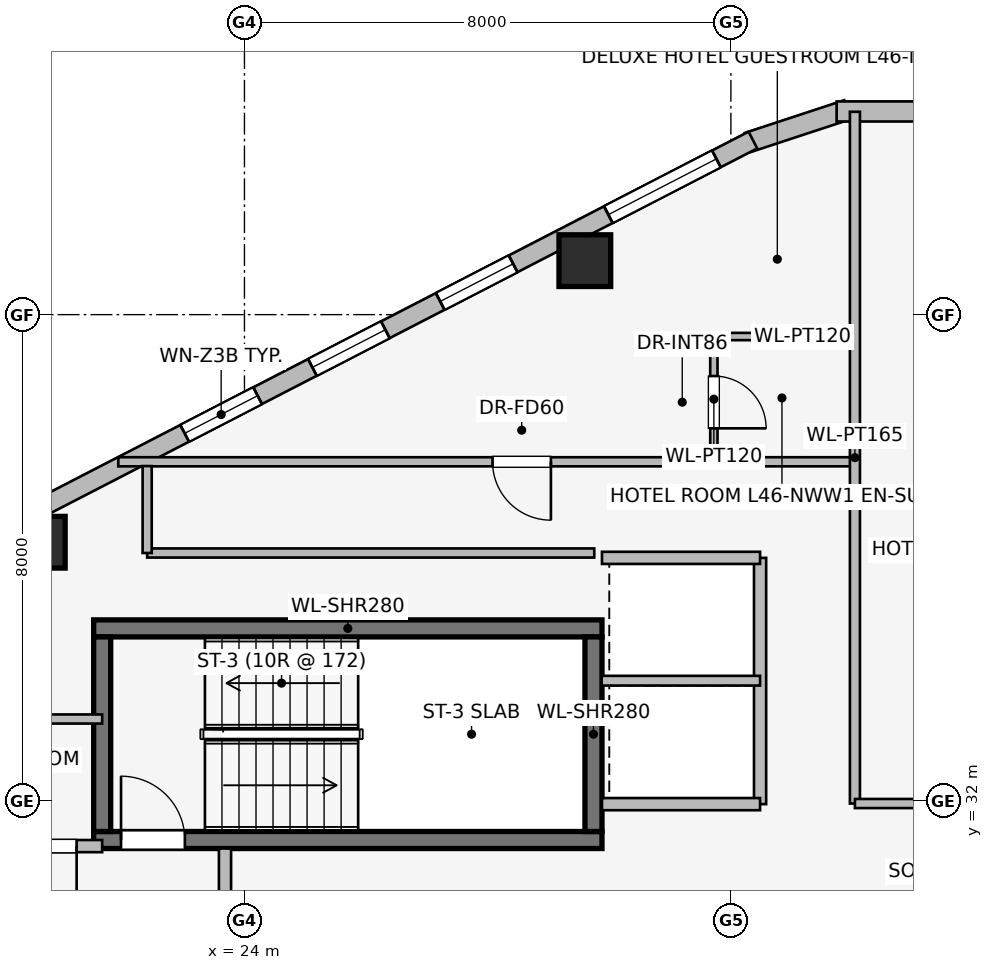
"""IFC4 building model, lengths in metres.
Left out: names, types, materials, properties, quantities, classifications, styles, units other than length and angle.
Written with IfcOpenShell. Run it as: python <this file> out.ifc"""

import sys

from ifc_helpers import new_model, si_unit, direction, frame, frame_2d, origin, origin_2d, place, context, subcontext, project, spatial, rectangle, extrude, element, fill, save


model = new_model("IFC4")
c1 = context("Model", 3, precision=1e-05, world=origin(), true_north=direction((0.0, 1.0)))
c2 = subcontext(c1, "Body", "Model", "MODEL_VIEW")
j1 = project(units=[si_unit("LENGTHUNIT", "METRE"), si_unit("PLANEANGLEUNIT", "RADIAN")], contexts=[c1])
p1 = place(None, origin())
s1 = spatial("IfcSite", under=j1, at=p1, CompositionType="ELEMENT")
p2 = place(p1, origin())
s2 = spatial("IfcBuilding", under=s1, at=p2, CompositionType="ELEMENT")
p3 = place(p2, frame((0.0, 0.0, 170.55)))
s3 = spatial("IfcBuildingStorey", under=s2, at=p3, CompositionType="ELEMENT", Elevation=170.55)
p4 = place(p3, frame((21.52, 31.36, 0.0), z_axis=(0.0, 0.0, 1.0), x_axis=(1.0, 0.0, 0.0)))
e1 = element("IfcWall", 1, at=p4, inside=s3, PredefinedType="SHEAR", context=c2, shape_type="SweptSolid", body=[
    extrude(rectangle(XDim=8.36, YDim=0.28, at=frame_2d((4.18, 0.0))), origin(), (0.0, 0.0, 1.0), 3.45),
])
p5 = place(p4, frame((0.45, 0.0, 0.0)))
e2 = element("IfcOpeningElement", 2, at=p5, cuts=e1, PredefinedType="OPENING", context=c2, shape_type="SweptSolid", body=[
    extrude(rectangle(XDim=1.05, YDim=2.0, at=frame_2d((0.525, 1.0))), frame((0.0, 0.15, 0.0), z_axis=(0.0, -1.0, 0.0), x_axis=(1.0, 0.0, 0.0)), (0.0, 0.0, 1.0), 0.3),
])
p6 = place(p3, frame((29.88, 34.84, 0.0), z_axis=(0.0, 0.0, 1.0), x_axis=(-1.0, 0.0, 0.0)))
e3 = element("IfcWall", 3, at=p6, inside=s3, PredefinedType="SHEAR", context=c2, shape_type="SweptSolid", body=[
    extrude(rectangle(XDim=8.36, YDim=0.28, at=frame_2d((4.18, 0.0))), origin(), (0.0, 0.0, 1.0), 3.45),
])
for number, where, z_axis, x_axis in (
    (4, (21.66, 34.7, 0.0), (0.0, 0.0, 1.0), (0.0, -1.0, 0.0)),
    (5, (29.74, 31.5, 0.0), (0.0, 0.0, 1.0), (0.0, 1.0, 0.0)),
):
    element("IfcWall", number, at=place(p3, frame(where, z_axis=z_axis, x_axis=x_axis)), inside=s3, PredefinedType="SHEAR", context=c2, shape_type="SweptSolid", body=[
        extrude(rectangle(XDim=3.2, YDim=0.28, at=frame_2d((1.6, 0.0))), origin(), (0.0, 0.0, 1.0), 3.45),
    ])
for number, where, z_axis, x_axis in (
    (6, (29.598, 40.888, 0.0), (0.0, 0.0, 1.0), (1.0, 0.0, 0.0)),
    (7, (20.626, 36.257, 0.0), (0.0, 0.0, 1.0), (1.0, 0.0, 0.0)),
):
    element("IfcColumn", number, at=place(p3, frame(where, z_axis=z_axis, x_axis=x_axis)), inside=s3, PredefinedType="COLUMN", context=c2, shape_type="SweptSolid", body=[
        extrude(rectangle(XDim=0.85, YDim=0.85, at=origin_2d()), origin(), (0.0, 0.0, 1.0), 3.45),
    ])
p7 = place(p3, frame((32.281, 42.832, 0.0), z_axis=(0.0, 0.0, 1.0), x_axis=(0.949937416267, 0.312440242569, 0.0)))
e8 = element("IfcWall", 8, at=p7, inside=s3, PredefinedType="STANDARD", context=c2, shape_type="SweptSolid", body=[
    extrude(rectangle(XDim=1.722, YDim=0.33, at=frame_2d((0.861, 0.0))), origin(), (0.0, 0.0, 1.0), 3.16),
])
p8 = place(p3, frame((33.739, 43.341, 0.0), z_axis=(0.0, 0.0, 1.0), x_axis=(1.0, 0.0, 0.0)))
e9 = element("IfcWall", 9, at=p8, inside=s3, PredefinedType="STANDARD", context=c2, shape_type="SweptSolid", body=[
    extrude(rectangle(XDim=1.722, YDim=0.33, at=frame_2d((0.861, 0.0))), origin(), (0.0, 0.0, 1.0), 3.16),
])
p9 = place(p3, frame((17.408, 35.153, 0.0), z_axis=(0.0, 0.0, 1.0), x_axis=(0.888626188278, 0.458632202867, 0.0)))
e10 = element("IfcWall", 10, at=p9, inside=s3, PredefinedType="STANDARD", context=c2, shape_type="SweptSolid", body=[
    extrude(rectangle(XDim=16.828, YDim=0.31, at=frame_2d((8.414, 0.0))), origin(), (0.0, 0.0, 1.0), 3.16),
])
p10 = place(p9, frame((0.675, 0.0, 0.75)))
e11 = element("IfcOpeningElement", 11, at=p10, cuts=e10, PredefinedType="OPENING", context=c2, shape_type="SweptSolid", body=[
    extrude(rectangle(XDim=2.0, YDim=1.5, at=frame_2d((1.0, 0.75))), frame((0.0, 0.165, 0.0), z_axis=(0.0, -1.0, 0.0), x_axis=(1.0, 0.0, 0.0)), (0.0, 0.0, 1.0), 0.33),
])
p11 = place(p9, frame((6.312, 0.0, 0.75)))
e12 = element("IfcOpeningElement", 12, at=p11, cuts=e10, PredefinedType="OPENING", context=c2, shape_type="SweptSolid", body=[
    extrude(rectangle(XDim=1.35, YDim=1.45, at=frame_2d((0.675, 0.725))), frame((0.0, 0.165, 0.0), z_axis=(0.0, -1.0, 0.0), x_axis=(1.0, 0.0, 0.0)), (0.0, 0.0, 1.0), 0.33),
])
p12 = place(p9, frame((8.676, 0.0, 0.75)))
e13 = element("IfcOpeningElement", 13, at=p12, cuts=e10, PredefinedType="OPENING", context=c2, shape_type="SweptSolid", body=[
    extrude(rectangle(XDim=1.35, YDim=1.45, at=frame_2d((0.675, 0.725))), frame((0.0, 0.165, 0.0), z_axis=(0.0, -1.0, 0.0), x_axis=(1.0, 0.0, 0.0)), (0.0, 0.0, 1.0), 0.33),
])
p13 = place(p9, frame((11.041, 0.0, 0.75)))
e14 = element("IfcOpeningElement", 14, at=p13, cuts=e10, PredefinedType="OPENING", context=c2, shape_type="SweptSolid", body=[
    extrude(rectangle(XDim=1.35, YDim=1.45, at=frame_2d((0.675, 0.725))), frame((0.0, 0.165, 0.0), z_axis=(0.0, -1.0, 0.0), x_axis=(1.0, 0.0, 0.0)), (0.0, 0.0, 1.0), 0.33),
])
p14 = place(p9, frame((14.153, 0.0, 0.75)))
e15 = element("IfcOpeningElement", 15, at=p14, cuts=e10, PredefinedType="OPENING", context=c2, shape_type="SweptSolid", body=[
    extrude(rectangle(XDim=2.0, YDim=1.5, at=frame_2d((1.0, 0.75))), frame((0.0, 0.165, 0.0), z_axis=(0.0, -1.0, 0.0), x_axis=(1.0, 0.0, 0.0)), (0.0, 0.0, 1.0), 0.33),
])
p15 = place(p3, frame((23.68, 25.68, 0.0), z_axis=(0.0, 0.0, 1.0), x_axis=(0.0, 1.0, 0.0)))
e16 = element("IfcWall", 16, at=p15, inside=s3, PredefinedType="PARTITIONING", context=c2, shape_type="SweptSolid", body=[
    extrude(rectangle(XDim=5.54, YDim=0.2, at=frame_2d((2.77, 0.0))), origin(), (0.0, 0.0, 1.0), 3.16),
])
p16 = place(p15, frame((1.8, 0.0, 0.0)))
e17 = element("IfcOpeningElement", 17, at=p16, cuts=e16, PredefinedType="OPENING", context=c2, shape_type="SweptSolid", body=[
    extrude(rectangle(XDim=1.05, YDim=2.0, at=frame_2d((0.525, 1.0))), frame((0.0, 0.11, 0.0), z_axis=(0.0, -1.0, 0.0), x_axis=(1.0, 0.0, 0.0)), (0.0, 0.0, 1.0), 0.22),
])
p17 = place(p3, frame((21.66, 31.26, 0.0), z_axis=(0.0, 0.0, 1.0), x_axis=(-1.0, 0.0, 0.0)))
e18 = element("IfcWall", 18, at=p17, inside=s3, PredefinedType="PARTITIONING", context=c2, shape_type="SweptSolid", body=[
    extrude(rectangle(XDim=2.01, YDim=0.2, at=frame_2d((1.005, 0.0))), origin(), (0.0, 0.0, 1.0), 3.16),
])
p18 = place(p17, frame((0.42, 0.0, 0.0)))
e19 = element("IfcOpeningElement", 19, at=p18, cuts=e18, PredefinedType="OPENING", context=c2, shape_type="SweptSolid", body=[
    extrude(rectangle(XDim=0.86, YDim=2.0, at=frame_2d((0.43, 1.0))), frame((0.0, 0.11, 0.0), z_axis=(0.0, -1.0, 0.0), x_axis=(1.0, 0.0, 0.0)), (0.0, 0.0, 1.0), 0.22),
])
p19 = place(p3, frame((32.48, 31.95, 0.0), z_axis=(0.0, 0.0, 1.0), x_axis=(0.0, 1.0, 0.0)))
e20 = element("IfcWall", 20, at=p19, inside=s3, PredefinedType="PARTITIONING", context=c2, shape_type="SweptSolid", body=[
    extrude(rectangle(XDim=4.05, YDim=0.2, at=frame_2d((2.025, 0.0))), origin(), (0.0, 0.0, 1.0), 3.16),
])
for number, where, z_axis, x_axis in (
    (21, (29.88, 36.0, 0.0), (0.0, 0.0, 1.0), (1.0, 0.0, 0.0)),
    (22, (32.48, 31.95, 0.0), (0.0, 0.0, 1.0), (-1.0, 0.0, 0.0)),
):
    element("IfcWall", number, at=place(p3, frame(where, z_axis=z_axis, x_axis=x_axis)), inside=s3, PredefinedType="PARTITIONING", context=c2, shape_type="SweptSolid", body=[
        extrude(rectangle(XDim=2.6, YDim=0.2, at=frame_2d((1.3, 0.0))), origin(), (0.0, 0.0, 1.0), 3.16),
    ])
p20 = place(p3, frame((29.875, 33.98, 0.0), z_axis=(0.0, 0.0, 1.0), x_axis=(1.0, 0.0, 0.0)))
e23 = element("IfcWall", 23, at=p20, inside=s3, PredefinedType="PARTITIONING", context=c2, shape_type="SweptSolid", body=[
    extrude(rectangle(XDim=2.605, YDim=0.16, at=frame_2d((1.302, 0.0))), origin(), (0.0, 0.0, 1.0), 2.552),
])
p21 = place(p3, frame((21.66, 33.35, 0.0), z_axis=(0.0, 0.0, 1.0), x_axis=(-1.0, 0.0, 0.0)))
e24 = element("IfcWall", 24, at=p21, inside=s3, PredefinedType="PARTITIONING", context=c2, shape_type="SweptSolid", body=[
    extrude(rectangle(XDim=2.56, YDim=0.15, at=frame_2d((1.28, 0.0))), origin(), (0.0, 0.0, 1.0), 3.16),
])
p22 = place(p3, frame((34.0, 39.64, 0.0), z_axis=(0.0, 0.0, 1.0), x_axis=(-1.0, 0.0, 0.0)))
e25 = element("IfcWall", 25, at=p22, inside=s3, PredefinedType="PARTITIONING", context=c2, shape_type="SweptSolid", body=[
    extrude(rectangle(XDim=2.34, YDim=0.12, at=frame_2d((1.17, 0.0))), origin(), (0.0, 0.0, 1.0), 3.16),
])
p23 = place(p3, frame((31.72, 39.64, 0.0), z_axis=(0.0, 0.0, 1.0), x_axis=(0.0, -1.0, 0.0)))
e26 = element("IfcWall", 26, at=p23, inside=s3, PredefinedType="PARTITIONING", context=c2, shape_type="SweptSolid", body=[
    extrude(rectangle(XDim=2.06, YDim=0.12, at=frame_2d((1.03, 0.0))), origin(), (0.0, 0.0, 1.0), 3.16),
])
p24 = place(p23, frame((0.65, 0.0, 0.0)))
e27 = element("IfcOpeningElement", 27, at=p24, cuts=e26, PredefinedType="OPENING", context=c2, shape_type="SweptSolid", body=[
    extrude(rectangle(XDim=0.86, YDim=2.0, at=frame_2d((0.43, 1.0))), frame((0.0, 0.07, 0.0), z_axis=(0.0, -1.0, 0.0), x_axis=(1.0, 0.0, 0.0)), (0.0, 0.0, 1.0), 0.14),
])
p25 = place(p3, frame((34.0, 37.58, 0.0), z_axis=(0.0, 0.0, 1.0), x_axis=(-1.0, 0.0, 0.0)))
e28 = element("IfcWall", 28, at=p25, inside=s3, PredefinedType="PARTITIONING", context=c2, shape_type="SweptSolid", body=[
    extrude(rectangle(XDim=12.075, YDim=0.15, at=frame_2d((6.038, 0.0))), origin(), (0.0, 0.0, 1.0), 2.552),
])
p26 = place(p25, frame((4.96, 0.0, 0.0)))
e29 = element("IfcOpeningElement", 29, at=p26, cuts=e28, PredefinedType="OPENING", context=c2, shape_type="SweptSolid", body=[
    extrude(rectangle(XDim=0.96, YDim=2.0, at=frame_2d((0.48, 1.0))), frame((0.0, 0.085, 0.0), z_axis=(0.0, -1.0, 0.0), x_axis=(1.0, 0.0, 0.0)), (0.0, 0.0, 1.0), 0.17),
])
p27 = place(p3, frame((34.04, 31.96, 0.0), z_axis=(0.0, 0.0, 1.0), x_axis=(0.0, 1.0, 0.0)))
e30 = element("IfcWall", 30, at=p27, inside=s3, PredefinedType="PARTITIONING", context=c2, shape_type="SweptSolid", body=[
    extrude(rectangle(XDim=11.376, YDim=0.165, at=frame_2d((5.688, 0.0))), origin(), (0.0, 0.0, 1.0), 3.16),
])
p28 = place(p3, frame((54.078, 31.96, 0.0), z_axis=(0.0, 0.0, 1.0), x_axis=(-1.0, 0.0, 0.0)))
e31 = element("IfcWall", 31, at=p28, inside=s3, PredefinedType="PARTITIONING", context=c2, shape_type="SweptSolid", body=[
    extrude(rectangle(XDim=20.038, YDim=0.15, at=frame_2d((10.019, 0.0))), origin(), (0.0, 0.0, 1.0), 3.16),
])
p29 = place(p28, frame((9.468, 0.0, 0.0)))
e32 = element("IfcOpeningElement", 32, at=p29, cuts=e31, PredefinedType="OPENING", context=c2, shape_type="SweptSolid", body=[
    extrude(rectangle(XDim=0.96, YDim=2.0, at=frame_2d((0.48, 1.0))), frame((0.0, 0.085, 0.0), z_axis=(0.0, -1.0, 0.0), x_axis=(1.0, 0.0, 0.0)), (0.0, 0.0, 1.0), 0.17),
])
p30 = place(p3, frame((29.753, 36.08, 0.0), z_axis=(0.0, 0.0, 1.0), x_axis=(-1.0, 0.0, 0.0)))
e33 = element("IfcWall", 33, at=p30, inside=s3, PredefinedType="PARTITIONING", context=c2, shape_type="SweptSolid", body=[
    extrude(rectangle(XDim=7.353, YDim=0.15, at=frame_2d((3.677, 0.0))), origin(), (0.0, 0.0, 1.0), 3.16),
])
p31 = place(p3, frame((22.4, 36.08, 0.0), z_axis=(0.0, 0.0, 1.0), x_axis=(0.0, 1.0, 0.0)))
e34 = element("IfcWall", 34, at=p31, inside=s3, PredefinedType="PARTITIONING", context=c2, shape_type="SweptSolid", body=[
    extrude(rectangle(XDim=1.43, YDim=0.15, at=frame_2d((0.715, 0.0))), origin(), (0.0, 0.0, 1.0), 3.16),
])
p32 = place(p11, origin())
e35 = element("IfcWindow", 35, at=p32, inside=s3, PartitioningType="SINGLE_PANEL", PredefinedType="WINDOW", context=c2, shape_type="SweptSolid", body=[
    extrude(rectangle(XDim=1.35, YDim=1.45, at=frame_2d((0.675, 0.725))), frame((0.0, 0.03, 0.0), z_axis=(0.0, -1.0, 0.0), x_axis=(1.0, 0.0, 0.0)), (0.0, 0.0, 1.0), 0.06),
])
fill(e12, e35)
p33 = place(p12, origin())
e36 = element("IfcWindow", 36, at=p33, inside=s3, PartitioningType="SINGLE_PANEL", PredefinedType="WINDOW", context=c2, shape_type="SweptSolid", body=[
    extrude(rectangle(XDim=1.35, YDim=1.45, at=frame_2d((0.675, 0.725))), frame((0.0, 0.03, 0.0), z_axis=(0.0, -1.0, 0.0), x_axis=(1.0, 0.0, 0.0)), (0.0, 0.0, 1.0), 0.06),
])
fill(e13, e36)
p34 = place(p13, origin())
e37 = element("IfcWindow", 37, at=p34, inside=s3, PartitioningType="SINGLE_PANEL", PredefinedType="WINDOW", context=c2, shape_type="SweptSolid", body=[
    extrude(rectangle(XDim=1.35, YDim=1.45, at=frame_2d((0.675, 0.725))), frame((0.0, 0.03, 0.0), z_axis=(0.0, -1.0, 0.0), x_axis=(1.0, 0.0, 0.0)), (0.0, 0.0, 1.0), 0.06),
])
fill(e14, e37)
p35 = place(p14, origin())
e38 = element("IfcWindow", 38, at=p35, inside=s3, PartitioningType="SINGLE_PANEL", PredefinedType="WINDOW", context=c2, shape_type="SweptSolid", body=[
    extrude(rectangle(XDim=2.0, YDim=1.5, at=frame_2d((1.0, 0.75))), frame((0.0, 0.03, 0.0), z_axis=(0.0, -1.0, 0.0), x_axis=(1.0, 0.0, 0.0)), (0.0, 0.0, 1.0), 0.06),
])
fill(e15, e38)
p36 = place(p5, origin())
e39 = element("IfcDoor", 39, at=p36, inside=s3, OperationType="SINGLE_SWING_LEFT", PredefinedType="DOOR", context=c2, shape_type="SweptSolid", body=[
    extrude(rectangle(XDim=1.05, YDim=2.0, at=frame_2d((0.525, 1.0))), frame((0.0, 0.025, 0.0), z_axis=(0.0, -1.0, 0.0), x_axis=(1.0, 0.0, 0.0)), (0.0, 0.0, 1.0), 0.05),
])
fill(e2, e39)
p37 = place(p18, origin())
e40 = element("IfcDoor", 40, at=p37, inside=s3, OperationType="SINGLE_SWING_LEFT", PredefinedType="DOOR", context=c2, shape_type="SweptSolid", body=[
    extrude(rectangle(XDim=0.86, YDim=2.0, at=frame_2d((0.43, 1.0))), frame((0.0, 0.025, 0.0), z_axis=(0.0, -1.0, 0.0), x_axis=(1.0, 0.0, 0.0)), (0.0, 0.0, 1.0), 0.05),
])
fill(e19, e40)
p38 = place(p24, origin())
e41 = element("IfcDoor", 41, at=p38, inside=s3, OperationType="SINGLE_SWING_RIGHT", PredefinedType="DOOR", context=c2, shape_type="SweptSolid", body=[
    extrude(rectangle(XDim=0.86, YDim=2.0, at=frame_2d((0.43, 1.0))), frame((0.0, 0.025, 0.0), z_axis=(0.0, -1.0, 0.0), x_axis=(1.0, 0.0, 0.0)), (0.0, 0.0, 1.0), 0.05),
])
fill(e27, e41)
p39 = place(p26, origin())
e42 = element("IfcDoor", 42, at=p39, inside=s3, OperationType="SINGLE_SWING_LEFT", PredefinedType="DOOR", context=c2, shape_type="SweptSolid", body=[
    extrude(rectangle(XDim=0.96, YDim=2.0, at=frame_2d((0.48, 1.0))), frame((0.0, 0.025, 0.0), z_axis=(0.0, -1.0, 0.0), x_axis=(1.0, 0.0, 0.0)), (0.0, 0.0, 1.0), 0.05),
])
fill(e29, e42)
save(model, sys.argv[1])
